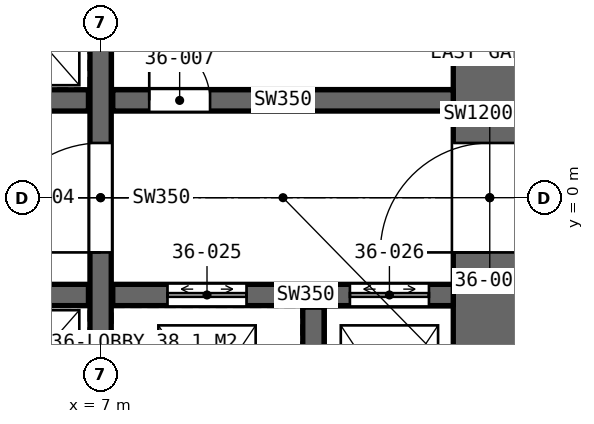
"""IFC4 building model, lengths in metres.
Left out: names, types, materials, properties, quantities, classifications, styles, units other than length and angle.
Written with IfcOpenShell. Run it as: python <this file> out.ifc"""

import sys

from ifc_helpers import new_model, si_unit, direction, frame, frame_2d, origin, place, context, subcontext, project, spatial, rectangle, extrude, element, fill, save


model = new_model("IFC4")
c1 = context("Model", 3, precision=1e-05, world=origin(), true_north=direction((0.0, 1.0)))
c2 = subcontext(c1, "Body", "Model", "MODEL_VIEW")
j1 = project(units=[si_unit("LENGTHUNIT", "METRE"), si_unit("PLANEANGLEUNIT", "RADIAN")], contexts=[c1])
p1 = place(None, origin())
s1 = spatial("IfcSite", under=j1, at=p1, CompositionType="ELEMENT")
p2 = place(p1, origin())
s2 = spatial("IfcBuilding", under=s1, at=p2, CompositionType="ELEMENT")
p3 = place(p2, frame((0.0, 0.0, 168.0)))
s3 = spatial("IfcBuildingStorey", under=s2, at=p3, CompositionType="ELEMENT", Elevation=168.0)
p4 = place(p3, frame((13.4, -8.8, 0.0), z_axis=(0.0, 0.0, 1.0), x_axis=(0.0, 1.0, 0.0)))
e1 = element("IfcWall", 1, at=p4, inside=s3, PredefinedType="SHEAR", context=c2, shape_type="SweptSolid", body=[
    extrude(rectangle(XDim=17.6, YDim=1.2, at=frame_2d((8.8, 0.0))), origin(), (0.0, 0.0, 1.0), 4.2),
])
p5 = place(p4, frame((7.9, 0.0, 0.0)))
e2 = element("IfcOpeningElement", 2, at=p5, cuts=e1, PredefinedType="OPENING", context=c2, shape_type="SweptSolid", body=[
    extrude(rectangle(XDim=1.8, YDim=2.4, at=frame_2d((0.9, 1.2))), frame((0.0, 0.61, 0.0), z_axis=(0.0, -1.0, 0.0), x_axis=(1.0, 0.0, 0.0)), (0.0, 0.0, 1.0), 1.22),
])
p6 = place(p3, frame((7.0, -8.8, 0.0), z_axis=(0.0, 0.0, 1.0), x_axis=(0.0, 1.0, 0.0)))
e3 = element("IfcWall", 3, at=p6, inside=s3, PredefinedType="SHEAR", context=c2, shape_type="SweptSolid", body=[
    extrude(rectangle(XDim=17.6, YDim=0.35, at=frame_2d((8.8, 0.0))), origin(), (0.0, 0.0, 1.0), 4.2),
])
p7 = place(p6, frame((7.9, 0.0, 0.0)))
e4 = element("IfcOpeningElement", 4, at=p7, cuts=e3, PredefinedType="OPENING", context=c2, shape_type="SweptSolid", body=[
    extrude(rectangle(XDim=1.8, YDim=2.4, at=frame_2d((0.9, 1.2))), frame((0.0, 0.185, 0.0), z_axis=(0.0, -1.0, 0.0), x_axis=(1.0, 0.0, 0.0)), (0.0, 0.0, 1.0), 0.37),
])
p8 = place(p3, frame((-6.8, 1.6, 0.0), z_axis=(0.0, 0.0, 1.0), x_axis=(1.0, 0.0, 0.0)))
e5 = element("IfcWall", 5, at=p8, inside=s3, PredefinedType="SHEAR", context=c2, shape_type="SweptSolid", body=[
    extrude(rectangle(XDim=13.6, YDim=0.35, at=frame_2d((6.8, 0.0))), origin(), (0.0, 0.0, 1.0), 4.2),
])
p9 = place(p8, frame((2.365, 0.0, 0.0)))
e6 = element("IfcOpeningElement", 6, at=p9, cuts=e5, PredefinedType="OPENING", context=c2, shape_type="SweptSolid", body=[
    extrude(rectangle(XDim=1.0, YDim=2.4, at=frame_2d((0.5, 1.2))), frame((0.0, 0.185, 0.0), z_axis=(0.0, -1.0, 0.0), x_axis=(1.0, 0.0, 0.0)), (0.0, 0.0, 1.0), 0.37),
])
p10 = place(p8, frame((7.835, 0.0, 0.0)))
e7 = element("IfcOpeningElement", 7, at=p10, cuts=e5, PredefinedType="OPENING", context=c2, shape_type="SweptSolid", body=[
    extrude(rectangle(XDim=1.0, YDim=2.4, at=frame_2d((0.5, 1.2))), frame((0.0, 0.185, 0.0), z_axis=(0.0, -1.0, 0.0), x_axis=(1.0, 0.0, 0.0)), (0.0, 0.0, 1.0), 0.37),
])
p11 = place(p3, frame((-6.8, -1.6, 0.0), z_axis=(0.0, 0.0, 1.0), x_axis=(1.0, 0.0, 0.0)))
e8 = element("IfcWall", 8, at=p11, inside=s3, PredefinedType="SHEAR", context=c2, shape_type="SweptSolid", body=[
    extrude(rectangle(XDim=13.6, YDim=0.35, at=frame_2d((6.8, 0.0))), origin(), (0.0, 0.0, 1.0), 4.2),
])
p12 = place(p11, frame((0.7, 0.0, 0.0)))
e9 = element("IfcOpeningElement", 9, at=p12, cuts=e8, PredefinedType="OPENING", context=c2, shape_type="SweptSolid", body=[
    extrude(rectangle(XDim=1.1, YDim=2.4, at=frame_2d((0.55, 1.2))), frame((0.0, 0.185, 0.0), z_axis=(0.0, -1.0, 0.0), x_axis=(1.0, 0.0, 0.0)), (0.0, 0.0, 1.0), 0.37),
])
p13 = place(p11, frame((3.5, 0.0, 0.0)))
e10 = element("IfcOpeningElement", 10, at=p13, cuts=e8, PredefinedType="OPENING", context=c2, shape_type="SweptSolid", body=[
    extrude(rectangle(XDim=1.1, YDim=2.4, at=frame_2d((0.55, 1.2))), frame((0.0, 0.185, 0.0), z_axis=(0.0, -1.0, 0.0), x_axis=(1.0, 0.0, 0.0)), (0.0, 0.0, 1.0), 0.37),
])
p14 = place(p11, frame((6.3, 0.0, 0.0)))
e11 = element("IfcOpeningElement", 11, at=p14, cuts=e8, PredefinedType="OPENING", context=c2, shape_type="SweptSolid", body=[
    extrude(rectangle(XDim=1.1, YDim=2.4, at=frame_2d((0.55, 1.2))), frame((0.0, 0.185, 0.0), z_axis=(0.0, -1.0, 0.0), x_axis=(1.0, 0.0, 0.0)), (0.0, 0.0, 1.0), 0.37),
])
p15 = place(p11, frame((9.1, 0.0, 0.0)))
e12 = element("IfcOpeningElement", 12, at=p15, cuts=e8, PredefinedType="OPENING", context=c2, shape_type="SweptSolid", body=[
    extrude(rectangle(XDim=1.1, YDim=2.4, at=frame_2d((0.55, 1.2))), frame((0.0, 0.185, 0.0), z_axis=(0.0, -1.0, 0.0), x_axis=(1.0, 0.0, 0.0)), (0.0, 0.0, 1.0), 0.37),
])
p16 = place(p3, frame((7.2, 1.6, 0.0), z_axis=(0.0, 0.0, 1.0), x_axis=(1.0, 0.0, 0.0)))
e13 = element("IfcWall", 13, at=p16, inside=s3, PredefinedType="SHEAR", context=c2, shape_type="SweptSolid", body=[
    extrude(rectangle(XDim=5.6, YDim=0.35, at=frame_2d((2.8, 0.0))), origin(), (0.0, 0.0, 1.0), 4.2),
])
p17 = place(p16, frame((0.6, 0.0, 0.0)))
e14 = element("IfcOpeningElement", 14, at=p17, cuts=e13, PredefinedType="OPENING", context=c2, shape_type="SweptSolid", body=[
    extrude(rectangle(XDim=1.0, YDim=2.4, at=frame_2d((0.5, 1.2))), frame((0.0, 0.185, 0.0), z_axis=(0.0, -1.0, 0.0), x_axis=(1.0, 0.0, 0.0)), (0.0, 0.0, 1.0), 0.37),
])
p18 = place(p3, frame((7.2, -1.6, 0.0), z_axis=(0.0, 0.0, 1.0), x_axis=(1.0, 0.0, 0.0)))
e15 = element("IfcWall", 15, at=p18, inside=s3, PredefinedType="SHEAR", context=c2, shape_type="SweptSolid", body=[
    extrude(rectangle(XDim=5.6, YDim=0.35, at=frame_2d((2.8, 0.0))), origin(), (0.0, 0.0, 1.0), 4.2),
])
p19 = place(p18, frame((0.9, 0.0, 0.0)))
e16 = element("IfcOpeningElement", 16, at=p19, cuts=e15, PredefinedType="OPENING", context=c2, shape_type="SweptSolid", body=[
    extrude(rectangle(XDim=1.3, YDim=2.4, at=frame_2d((0.65, 1.2))), frame((0.0, 0.185, 0.0), z_axis=(0.0, -1.0, 0.0), x_axis=(1.0, 0.0, 0.0)), (0.0, 0.0, 1.0), 0.37),
])
p20 = place(p18, frame((3.9, 0.0, 0.0)))
e17 = element("IfcOpeningElement", 17, at=p20, cuts=e15, PredefinedType="OPENING", context=c2, shape_type="SweptSolid", body=[
    extrude(rectangle(XDim=1.3, YDim=2.4, at=frame_2d((0.65, 1.2))), frame((0.0, 0.185, 0.0), z_axis=(0.0, -1.0, 0.0), x_axis=(1.0, 0.0, 0.0)), (0.0, 0.0, 1.0), 0.37),
])
p21 = place(p3, frame((10.5, -4.8, 0.0), z_axis=(0.0, 0.0, 1.0), x_axis=(0.0, 1.0, 0.0)))
e18 = element("IfcWall", 18, at=p21, inside=s3, PredefinedType="SHEAR", context=c2, shape_type="SweptSolid", body=[
    extrude(rectangle(XDim=3.0, YDim=0.35, at=frame_2d((1.5, 0.0))), origin(), (0.0, 0.0, 1.0), 4.2),
])
p22 = place(p5, origin())
e19 = element("IfcDoor", 19, at=p22, inside=s3, OperationType="DOUBLE_DOOR_SINGLE_SWING", PredefinedType="DOOR", context=c2, shape_type="SweptSolid", body=[
    extrude(rectangle(XDim=1.8, YDim=2.4, at=frame_2d((0.9, 1.2))), frame((0.0, 0.025, 0.0), z_axis=(0.0, -1.0, 0.0), x_axis=(1.0, 0.0, 0.0)), (0.0, 0.0, 1.0), 0.05),
])
fill(e2, e19)
p23 = place(p7, origin())
e20 = element("IfcDoor", 20, at=p23, inside=s3, OperationType="DOUBLE_DOOR_SINGLE_SWING", PredefinedType="DOOR", context=c2, shape_type="SweptSolid", body=[
    extrude(rectangle(XDim=1.8, YDim=2.4, at=frame_2d((0.9, 1.2))), frame((0.0, 0.025, 0.0), z_axis=(0.0, -1.0, 0.0), x_axis=(1.0, 0.0, 0.0)), (0.0, 0.0, 1.0), 0.05),
])
fill(e4, e20)
p24 = place(p17, origin())
e21 = element("IfcDoor", 21, at=p24, inside=s3, OperationType="SINGLE_SWING_LEFT", PredefinedType="DOOR", context=c2, shape_type="SweptSolid", body=[
    extrude(rectangle(XDim=1.0, YDim=2.4, at=frame_2d((0.5, 1.2))), frame((0.0, 0.025, 0.0), z_axis=(0.0, -1.0, 0.0), x_axis=(1.0, 0.0, 0.0)), (0.0, 0.0, 1.0), 0.05),
])
fill(e14, e21)
p25 = place(p19, origin())
e22 = element("IfcDoor", 22, at=p25, inside=s3, OperationType="DOUBLE_DOOR_SLIDING", PredefinedType="DOOR", context=c2, shape_type="SweptSolid", body=[
    extrude(rectangle(XDim=1.3, YDim=2.4, at=frame_2d((0.65, 1.2))), frame((0.0, 0.025, 0.0), z_axis=(0.0, -1.0, 0.0), x_axis=(1.0, 0.0, 0.0)), (0.0, 0.0, 1.0), 0.05),
])
fill(e16, e22)
p26 = place(p20, origin())
e23 = element("IfcDoor", 23, at=p26, inside=s3, OperationType="DOUBLE_DOOR_SLIDING", PredefinedType="DOOR", context=c2, shape_type="SweptSolid", body=[
    extrude(rectangle(XDim=1.3, YDim=2.4, at=frame_2d((0.65, 1.2))), frame((0.0, 0.025, 0.0), z_axis=(0.0, -1.0, 0.0), x_axis=(1.0, 0.0, 0.0)), (0.0, 0.0, 1.0), 0.05),
])
fill(e17, e23)
save(model, sys.argv[1])
